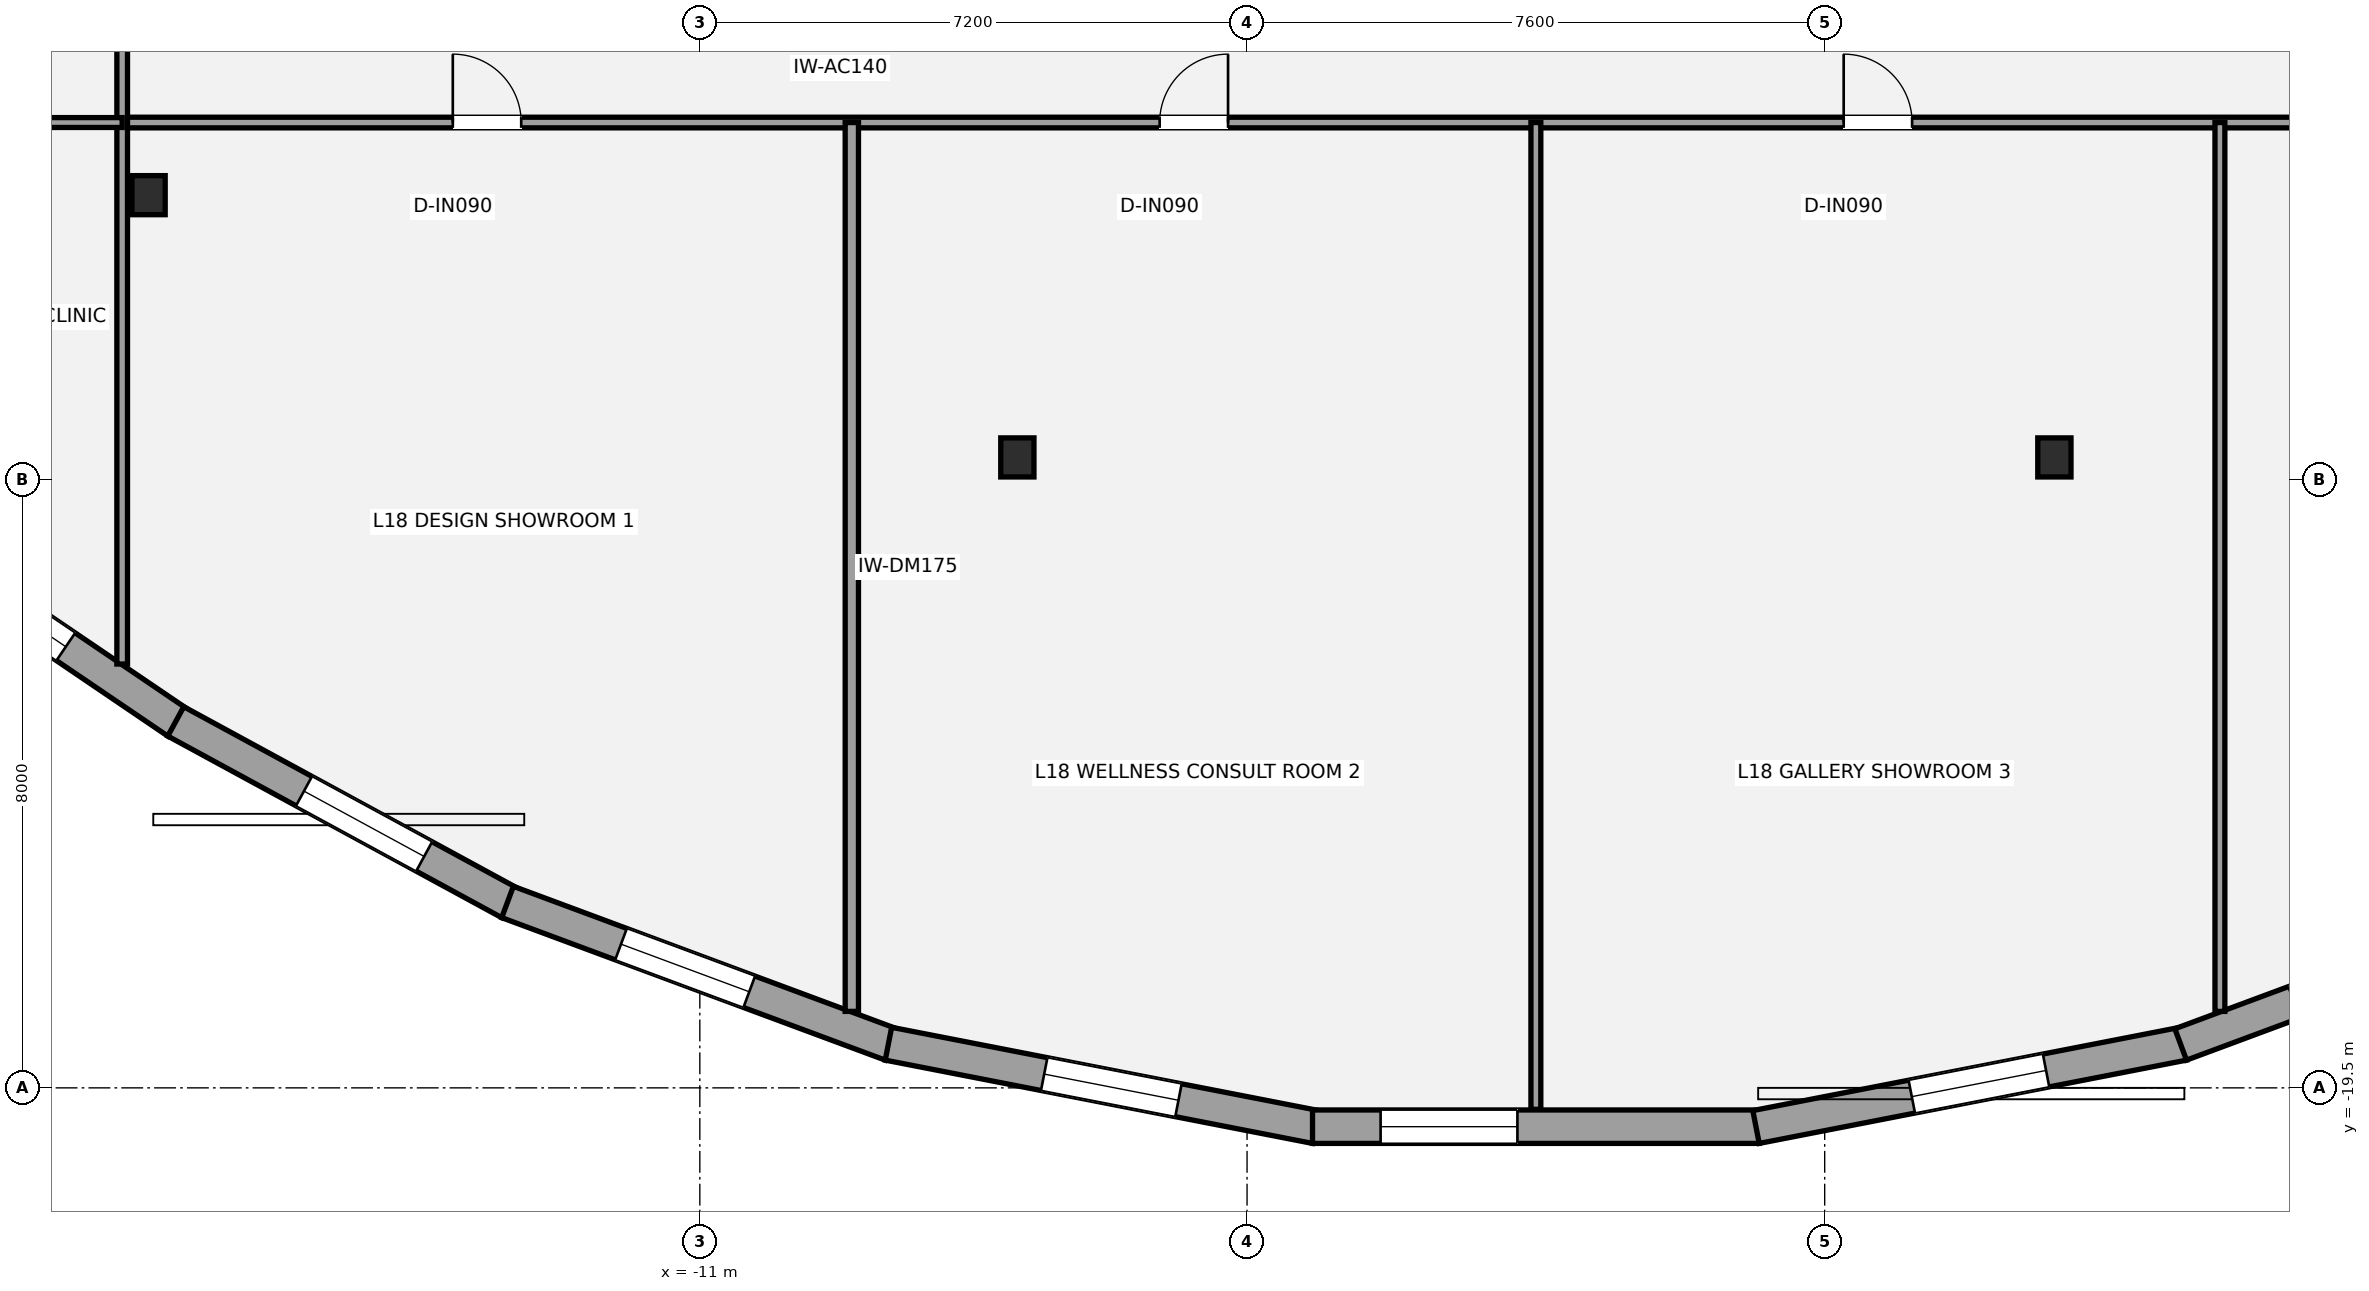
"""IFC4 building model, lengths in metres.
Left out: names, types, materials, properties, quantities, classifications, styles, units other than length and angle.
Written with IfcOpenShell. Run it as: python <this file> out.ifc"""

import sys

from ifc_helpers import new_model, si_unit, direction, frame, frame_2d, origin, origin_2d, place, context, subcontext, project, spatial, rectangle, i_section, extrude, element, fill, save


model = new_model("IFC4")
c1 = context("Model", 3, precision=1e-05, world=origin(), true_north=direction((0.0, 1.0)))
c2 = subcontext(c1, "Body", "Model", "MODEL_VIEW")
j1 = project(units=[si_unit("LENGTHUNIT", "METRE"), si_unit("PLANEANGLEUNIT", "RADIAN")], contexts=[c1])
p1 = place(None, origin())
s1 = spatial("IfcSite", under=j1, at=p1, CompositionType="ELEMENT")
p2 = place(p1, origin())
s2 = spatial("IfcBuilding", under=s1, at=p2, CompositionType="ELEMENT")
p3 = place(p2, frame((0.0, 0.0, 70.2)))
s3 = spatial("IfcBuildingStorey", under=s2, at=p3, CompositionType="ELEMENT", Elevation=70.2)
for number, where, z_axis, x_axis in (
    (1, (-18.253, -7.756, 0.0), (0.0, 0.0, 1.0), (1.0, 0.0, 0.0)),
    (2, (-6.822, -11.206, 0.0), (0.0, 0.0, 1.0), (1.0, 0.0, 0.0)),
    (3, (6.822, -11.206, 0.0), (0.0, 0.0, 1.0), (1.0, 0.0, 0.0)),
):
    element("IfcColumn", number, at=place(p3, frame(where, z_axis=z_axis, x_axis=x_axis)), inside=s3, PredefinedType="COLUMN", context=c2, shape_type="SweptSolid", body=[
        extrude(i_section(OverallWidth=0.437, OverallDepth=0.514, WebThickness=0.061, FlangeThickness=0.097, at=origin_2d()), origin(), (0.0, 0.0, 1.0), 3.6),
    ])
p4 = place(p3, frame((-17.876, -14.69, 0.0), z_axis=(0.0, 0.0, 1.0), x_axis=(-0.827645395623, 0.561251368911, 0.0)))
e4 = element("IfcWall", 4, at=p4, inside=s3, PredefinedType="STANDARD", context=c2, shape_type="SweptSolid", body=[
    extrude(rectangle(XDim=4.752, YDim=0.44, at=frame_2d((2.376, 0.0))), origin(), (0.0, 0.0, 1.0), 2.529),
])
p5 = place(p4, frame((1.771, 0.0, 0.65)))
e5 = element("IfcOpeningElement", 5, at=p5, cuts=e4, PredefinedType="OPENING", context=c2, shape_type="SweptSolid", body=[
    extrude(rectangle(XDim=1.8, YDim=1.7, at=frame_2d((0.9, 0.85))), frame((0.0, 0.23, 0.0), z_axis=(0.0, -1.0, 0.0), x_axis=(1.0, 0.0, 0.0)), (0.0, 0.0, 1.0), 0.46),
])
p6 = place(p3, frame((-13.501, -17.067, 0.0), z_axis=(0.0, 0.0, 1.0), x_axis=(-0.878571961318, 0.477609996531, 0.0)))
e6 = element("IfcWall", 6, at=p6, inside=s3, PredefinedType="STANDARD", context=c2, shape_type="SweptSolid", body=[
    extrude(rectangle(XDim=5.001, YDim=0.44, at=frame_2d((2.5, 0.0))), origin(), (0.0, 0.0, 1.0), 2.529),
])
p7 = place(p6, frame((1.281, 0.0, 0.65)))
e7 = element("IfcOpeningElement", 7, at=p7, cuts=e6, PredefinedType="OPENING", context=c2, shape_type="SweptSolid", body=[
    extrude(rectangle(XDim=1.8, YDim=1.7, at=frame_2d((0.9, 0.85))), frame((0.0, 0.23, 0.0), z_axis=(0.0, -1.0, 0.0), x_axis=(1.0, 0.0, 0.0)), (0.0, 0.0, 1.0), 0.46),
])
p8 = place(p3, frame((-8.484, -18.929, 0.0), z_axis=(0.0, 0.0, 1.0), x_axis=(-0.93742061918, 0.348199056195, 0.0)))
e8 = element("IfcWall", 8, at=p8, inside=s3, PredefinedType="STANDARD", context=c2, shape_type="SweptSolid", body=[
    extrude(rectangle(XDim=5.383, YDim=0.44, at=frame_2d((2.691, 0.0))), origin(), (0.0, 0.0, 1.0), 2.529),
])
p9 = place(p8, frame((1.99, 0.0, 0.65)))
e9 = element("IfcOpeningElement", 9, at=p9, cuts=e8, PredefinedType="OPENING", context=c2, shape_type="SweptSolid", body=[
    extrude(rectangle(XDim=1.8, YDim=1.7, at=frame_2d((0.9, 0.85))), frame((0.0, 0.23, 0.0), z_axis=(0.0, -1.0, 0.0), x_axis=(1.0, 0.0, 0.0)), (0.0, 0.0, 1.0), 0.46),
])
p10 = place(p3, frame((-2.896, -20.015, 0.0), z_axis=(0.0, 0.0, 1.0), x_axis=(-0.981531216559, 0.191302041079, 0.0)))
e10 = element("IfcWall", 10, at=p10, inside=s3, PredefinedType="STANDARD", context=c2, shape_type="SweptSolid", body=[
    extrude(rectangle(XDim=5.728, YDim=0.44, at=frame_2d((2.864, 0.0))), origin(), (0.0, 0.0, 1.0), 2.529),
])
p11 = place(p10, frame((1.84, 0.0, 0.65)))
e11 = element("IfcOpeningElement", 11, at=p11, cuts=e10, PredefinedType="OPENING", context=c2, shape_type="SweptSolid", body=[
    extrude(rectangle(XDim=1.8, YDim=1.7, at=frame_2d((0.9, 0.85))), frame((0.0, 0.23, 0.0), z_axis=(0.0, -1.0, 0.0), x_axis=(1.0, 0.0, 0.0)), (0.0, 0.0, 1.0), 0.46),
])
p12 = place(p3, frame((2.939, -20.011, 0.0), z_axis=(0.0, 0.0, 1.0), x_axis=(-1.0, 0.0, 0.0)))
e12 = element("IfcWall", 12, at=p12, inside=s3, PredefinedType="STANDARD", context=c2, shape_type="SweptSolid", body=[
    extrude(rectangle(XDim=5.877, YDim=0.44, at=frame_2d((2.939, 0.0))), origin(), (0.0, 0.0, 1.0), 2.529),
])
p13 = place(p12, frame((3.181, 0.0, 0.65)))
e13 = element("IfcOpeningElement", 13, at=p13, cuts=e12, PredefinedType="OPENING", context=c2, shape_type="SweptSolid", body=[
    extrude(rectangle(XDim=1.8, YDim=1.7, at=frame_2d((0.9, 0.85))), frame((0.0, 0.23, 0.0), z_axis=(0.0, -1.0, 0.0), x_axis=(1.0, 0.0, 0.0)), (0.0, 0.0, 1.0), 0.46),
])
p14 = place(p3, frame((8.518, -18.919, 0.0), z_axis=(0.0, 0.0, 1.0), x_axis=(-0.981531216559, -0.191302041079, 0.0)))
e14 = element("IfcWall", 14, at=p14, inside=s3, PredefinedType="STANDARD", context=c2, shape_type="SweptSolid", body=[
    extrude(rectangle(XDim=5.728, YDim=0.44, at=frame_2d((2.864, 0.0))), origin(), (0.0, 0.0, 1.0), 2.529),
])
p15 = place(p14, frame((1.84, 0.0, 0.65)))
e15 = element("IfcOpeningElement", 15, at=p15, cuts=e14, PredefinedType="OPENING", context=c2, shape_type="SweptSolid", body=[
    extrude(rectangle(XDim=1.8, YDim=1.7, at=frame_2d((0.9, 0.85))), frame((0.0, 0.23, 0.0), z_axis=(0.0, -1.0, 0.0), x_axis=(1.0, 0.0, 0.0)), (0.0, 0.0, 1.0), 0.46),
])
p16 = place(p3, frame((13.53, -17.055, 0.0), z_axis=(0.0, 0.0, 1.0), x_axis=(-0.93742061918, -0.348199056195, 0.0)))
e16 = element("IfcWall", 16, at=p16, inside=s3, PredefinedType="STANDARD", context=c2, shape_type="SweptSolid", body=[
    extrude(rectangle(XDim=5.383, YDim=0.44, at=frame_2d((2.691, 0.0))), origin(), (0.0, 0.0, 1.0), 2.529),
])
p17 = place(p16, frame((1.99, 0.0, 0.65)))
e17 = element("IfcOpeningElement", 17, at=p17, cuts=e16, PredefinedType="OPENING", context=c2, shape_type="SweptSolid", body=[
    extrude(rectangle(XDim=1.8, YDim=1.7, at=frame_2d((0.9, 0.85))), frame((0.0, 0.23, 0.0), z_axis=(0.0, -1.0, 0.0), x_axis=(1.0, 0.0, 0.0)), (0.0, 0.0, 1.0), 0.46),
])
p18 = place(p3, frame((-18.6, -6.8, 0.0), z_axis=(0.0, 0.0, 1.0), x_axis=(1.0, 0.0, 0.0)))
e18 = element("IfcWall", 18, at=p18, inside=s3, PredefinedType="PARTITIONING", context=c2, shape_type="SweptSolid", body=[
    extrude(rectangle(XDim=34.7, YDim=0.14, at=frame_2d((17.35, 0.0))), origin(), (0.0, 0.0, 1.0), 2.853),
])
p19 = place(p18, frame((4.35, 0.0, 0.0)))
e19 = element("IfcOpeningElement", 19, at=p19, cuts=e18, PredefinedType="OPENING", context=c2, shape_type="SweptSolid", body=[
    extrude(rectangle(XDim=0.9, YDim=2.1, at=frame_2d((0.45, 1.05))), frame((0.0, 0.08, 0.0), z_axis=(0.0, -1.0, 0.0), x_axis=(1.0, 0.0, 0.0)), (0.0, 0.0, 1.0), 0.16),
])
p20 = place(p18, frame((13.65, 0.0, 0.0)))
e20 = element("IfcOpeningElement", 20, at=p20, cuts=e18, PredefinedType="OPENING", context=c2, shape_type="SweptSolid", body=[
    extrude(rectangle(XDim=0.9, YDim=2.1, at=frame_2d((0.45, 1.05))), frame((0.0, 0.08, 0.0), z_axis=(0.0, -1.0, 0.0), x_axis=(1.0, 0.0, 0.0)), (0.0, 0.0, 1.0), 0.16),
])
p21 = place(p18, frame((22.65, 0.0, 0.0)))
e21 = element("IfcOpeningElement", 21, at=p21, cuts=e18, PredefinedType="OPENING", context=c2, shape_type="SweptSolid", body=[
    extrude(rectangle(XDim=0.9, YDim=2.1, at=frame_2d((0.45, 1.05))), frame((0.0, 0.08, 0.0), z_axis=(0.0, -1.0, 0.0), x_axis=(1.0, 0.0, 0.0)), (0.0, 0.0, 1.0), 0.16),
])
p22 = place(p18, frame((30.4, 0.0, 0.0)))
e22 = element("IfcOpeningElement", 22, at=p22, cuts=e18, PredefinedType="OPENING", context=c2, shape_type="SweptSolid", body=[
    extrude(rectangle(XDim=1.5, YDim=2.15, at=frame_2d((0.75, 1.075))), frame((0.0, 0.08, 0.0), z_axis=(0.0, -1.0, 0.0), x_axis=(1.0, 0.0, 0.0)), (0.0, 0.0, 1.0), 0.16),
])
p23 = place(p3, frame((-18.6, -13.924, 0.0), z_axis=(0.0, 0.0, 1.0), x_axis=(0.0, 1.0, 0.0)))
e23 = element("IfcWall", 23, at=p23, inside=s3, PredefinedType="PARTITIONING", context=c2, shape_type="SweptSolid", body=[
    extrude(rectangle(XDim=19.774, YDim=0.14, at=frame_2d((9.887, 0.0))), origin(), (0.0, 0.0, 1.0), 2.779),
])
p24 = place(p23, frame((9.074, 0.0, 0.0)))
e24 = element("IfcOpeningElement", 24, at=p24, cuts=e23, PredefinedType="OPENING", context=c2, shape_type="SweptSolid", body=[
    extrude(rectangle(XDim=0.9, YDim=2.1, at=frame_2d((0.45, 1.05))), frame((0.0, 0.08, 0.0), z_axis=(0.0, -1.0, 0.0), x_axis=(1.0, 0.0, 0.0)), (0.0, 0.0, 1.0), 0.16),
])
p25 = place(p23, frame((13.774, 0.0, 0.0)))
e25 = element("IfcOpeningElement", 25, at=p25, cuts=e23, PredefinedType="OPENING", context=c2, shape_type="SweptSolid", body=[
    extrude(rectangle(XDim=0.9, YDim=2.1, at=frame_2d((0.45, 1.05))), frame((0.0, 0.08, 0.0), z_axis=(0.0, -1.0, 0.0), x_axis=(1.0, 0.0, 0.0)), (0.0, 0.0, 1.0), 0.16),
])
p26 = place(p23, frame((17.699, 0.0, 0.0)))
e26 = element("IfcOpeningElement", 26, at=p26, cuts=e23, PredefinedType="OPENING", context=c2, shape_type="SweptSolid", body=[
    extrude(rectangle(XDim=0.9, YDim=2.1, at=frame_2d((0.45, 1.05))), frame((0.0, 0.08, 0.0), z_axis=(0.0, -1.0, 0.0), x_axis=(1.0, 0.0, 0.0)), (0.0, 0.0, 1.0), 0.16),
])
p27 = place(p3, frame((-9.0, -18.494, 0.0), z_axis=(0.0, 0.0, 1.0), x_axis=(0.0, 1.0, 0.0)))
e27 = element("IfcWall", 27, at=p27, inside=s3, PredefinedType="PARTITIONING", context=c2, shape_type="SweptSolid", body=[
    extrude(rectangle(XDim=11.694, YDim=0.175, at=frame_2d((5.847, 0.0))), origin(), (0.0, 0.0, 1.0), 2.853),
])
p28 = place(p3, frame((0.0, -19.783, 0.0), z_axis=(0.0, 0.0, 1.0), x_axis=(0.0, 1.0, 0.0)))
e28 = element("IfcWall", 28, at=p28, inside=s3, PredefinedType="PARTITIONING", context=c2, shape_type="SweptSolid", body=[
    extrude(rectangle(XDim=12.983, YDim=0.13, at=frame_2d((6.491, 0.0))), origin(), (0.0, 0.0, 1.0), 2.853),
])
p29 = place(p3, frame((9.0, -18.494, 0.0), z_axis=(0.0, 0.0, 1.0), x_axis=(0.0, 1.0, 0.0)))
e29 = element("IfcWall", 29, at=p29, inside=s3, PredefinedType="PARTITIONING", context=c2, shape_type="SweptSolid", body=[
    extrude(rectangle(XDim=11.694, YDim=0.13, at=frame_2d((5.847, 0.0))), origin(), (0.0, 0.0, 1.0), 3.4),
])
p30 = place(p3, frame((-26.84, -6.8, 0.0), z_axis=(0.0, 0.0, 1.0), x_axis=(1.0, 0.0, 0.0)))
e30 = element("IfcWall", 30, at=p30, inside=s3, PredefinedType="PARTITIONING", context=c2, shape_type="SweptSolid", body=[
    extrude(rectangle(XDim=8.24, YDim=0.13, at=frame_2d((4.12, 0.0))), origin(), (0.0, 0.0, 1.0), 2.779),
])
p31 = place(p30, frame((0.75, 0.0, 0.0)))
e31 = element("IfcOpeningElement", 31, at=p31, cuts=e30, PredefinedType="OPENING", context=c2, shape_type="SweptSolid", body=[
    extrude(rectangle(XDim=0.9, YDim=2.1, at=frame_2d((0.45, 1.05))), frame((0.0, 0.075, 0.0), z_axis=(0.0, -1.0, 0.0), x_axis=(1.0, 0.0, 0.0)), (0.0, 0.0, 1.0), 0.15),
])
p32 = place(p5, origin())
e32 = element("IfcWindow", 32, at=p32, inside=s3, PartitioningType="SINGLE_PANEL", PredefinedType="WINDOW", context=c2, shape_type="SweptSolid", body=[
    extrude(rectangle(XDim=1.8, YDim=1.7, at=frame_2d((0.9, 0.85))), frame((0.0, -0.01, 0.0), z_axis=(0.0, -1.0, 0.0), x_axis=(1.0, 0.0, 0.0)), (0.0, 0.0, 1.0), 0.06),
])
fill(e5, e32)
p33 = place(p7, origin())
e33 = element("IfcWindow", 33, at=p33, inside=s3, PartitioningType="SINGLE_PANEL", PredefinedType="WINDOW", context=c2, shape_type="SweptSolid", body=[
    extrude(rectangle(XDim=1.8, YDim=1.7, at=frame_2d((0.9, 0.85))), frame((0.0, -0.01, 0.0), z_axis=(0.0, -1.0, 0.0), x_axis=(1.0, 0.0, 0.0)), (0.0, 0.0, 1.0), 0.06),
])
fill(e7, e33)
p34 = place(p9, origin())
e34 = element("IfcWindow", 34, at=p34, inside=s3, PartitioningType="SINGLE_PANEL", PredefinedType="WINDOW", context=c2, shape_type="SweptSolid", body=[
    extrude(rectangle(XDim=1.8, YDim=1.7, at=frame_2d((0.9, 0.85))), frame((0.0, -0.01, 0.0), z_axis=(0.0, -1.0, 0.0), x_axis=(1.0, 0.0, 0.0)), (0.0, 0.0, 1.0), 0.06),
])
fill(e9, e34)
p35 = place(p11, origin())
e35 = element("IfcWindow", 35, at=p35, inside=s3, PartitioningType="SINGLE_PANEL", PredefinedType="WINDOW", context=c2, shape_type="SweptSolid", body=[
    extrude(rectangle(XDim=1.8, YDim=1.7, at=frame_2d((0.9, 0.85))), frame((0.0, -0.01, 0.0), z_axis=(0.0, -1.0, 0.0), x_axis=(1.0, 0.0, 0.0)), (0.0, 0.0, 1.0), 0.06),
])
fill(e11, e35)
p36 = place(p13, origin())
e36 = element("IfcWindow", 36, at=p36, inside=s3, PartitioningType="SINGLE_PANEL", PredefinedType="WINDOW", context=c2, shape_type="SweptSolid", body=[
    extrude(rectangle(XDim=1.8, YDim=1.7, at=frame_2d((0.9, 0.85))), frame((0.0, -0.01, 0.0), z_axis=(0.0, -1.0, 0.0), x_axis=(1.0, 0.0, 0.0)), (0.0, 0.0, 1.0), 0.06),
])
fill(e13, e36)
p37 = place(p15, origin())
e37 = element("IfcWindow", 37, at=p37, inside=s3, PartitioningType="SINGLE_PANEL", PredefinedType="WINDOW", context=c2, shape_type="SweptSolid", body=[
    extrude(rectangle(XDim=1.8, YDim=1.7, at=frame_2d((0.9, 0.85))), frame((0.0, -0.01, 0.0), z_axis=(0.0, -1.0, 0.0), x_axis=(1.0, 0.0, 0.0)), (0.0, 0.0, 1.0), 0.06),
])
fill(e15, e37)
p38 = place(p19, origin())
e38 = element("IfcDoor", 38, at=p38, inside=s3, OperationType="SINGLE_SWING_LEFT", PredefinedType="DOOR", context=c2, shape_type="SweptSolid", body=[
    extrude(rectangle(XDim=0.9, YDim=2.1, at=frame_2d((0.45, 1.05))), frame((0.0, 0.025, 0.0), z_axis=(0.0, -1.0, 0.0), x_axis=(1.0, 0.0, 0.0)), (0.0, 0.0, 1.0), 0.05),
])
fill(e19, e38)
p39 = place(p20, origin())
e39 = element("IfcDoor", 39, at=p39, inside=s3, OperationType="SINGLE_SWING_RIGHT", PredefinedType="DOOR", context=c2, shape_type="SweptSolid", body=[
    extrude(rectangle(XDim=0.9, YDim=2.1, at=frame_2d((0.45, 1.05))), frame((0.0, 0.025, 0.0), z_axis=(0.0, -1.0, 0.0), x_axis=(1.0, 0.0, 0.0)), (0.0, 0.0, 1.0), 0.05),
])
fill(e20, e39)
p40 = place(p21, origin())
e40 = element("IfcDoor", 40, at=p40, inside=s3, OperationType="SINGLE_SWING_LEFT", PredefinedType="DOOR", context=c2, shape_type="SweptSolid", body=[
    extrude(rectangle(XDim=0.9, YDim=2.1, at=frame_2d((0.45, 1.05))), frame((0.0, 0.025, 0.0), z_axis=(0.0, -1.0, 0.0), x_axis=(1.0, 0.0, 0.0)), (0.0, 0.0, 1.0), 0.05),
])
fill(e21, e40)
save(model, sys.argv[1])
